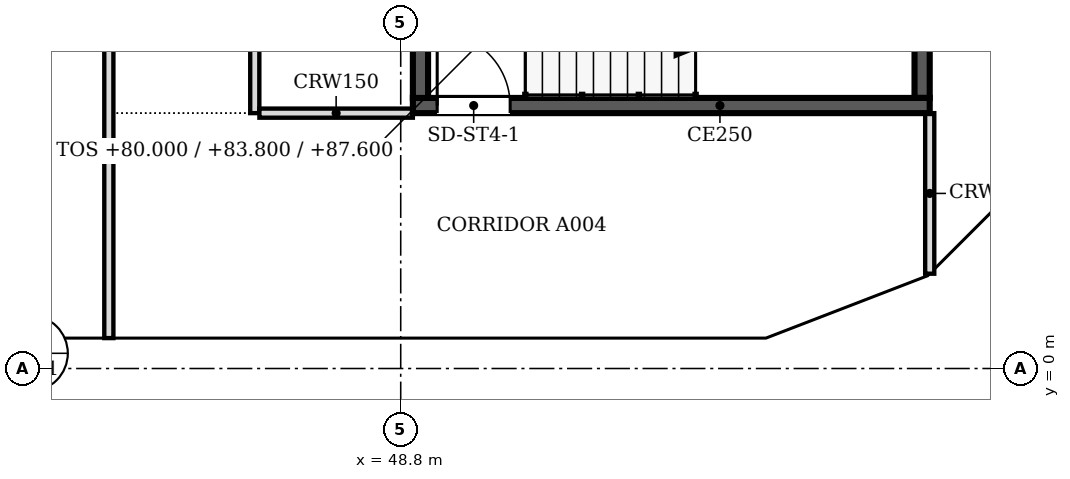
"""IFC4 building model, lengths in metres.
Left out: names, types, materials, properties, quantities, classifications, styles, units other than length and angle.
Written with IfcOpenShell. Run it as: python <this file> out.ifc"""

import sys

from ifc_helpers import new_model, si_unit, direction, frame, frame_2d, origin, place, context, subcontext, project, spatial, polyline, rectangle, outline, extrude, faceted_brep, source, transform, mapped, element, fill, save


model = new_model("IFC4")
c1 = context("Model", 3, precision=1e-05, world=origin(), true_north=direction((0.0, 1.0)))
c2 = subcontext(c1, "Body", "Model", "MODEL_VIEW")
j1 = project(units=[si_unit("LENGTHUNIT", "METRE"), si_unit("PLANEANGLEUNIT", "RADIAN")], contexts=[c1])
p1 = place(None, origin())
s1 = spatial("IfcSite", under=j1, at=p1, CompositionType="ELEMENT")
p2 = place(p1, origin())
s2 = spatial("IfcBuilding", under=s1, at=p2, CompositionType="ELEMENT")
p3 = place(p2, frame((0.0, 0.0, 80.0)))
s3 = spatial("IfcBuildingStorey", under=s2, at=p3, CompositionType="ELEMENT", Elevation=80.0)
m1 = source(origin(), c2, "Body", "SweptSolid", [
    extrude(outline(polyline([(3.05, 0.0), (6.1, 3.8), (3.05, 7.6), (0.0, 3.8), (3.05, 0.0)])), frame((0.0, 0.25, 0.0), z_axis=(0.0, -1.0, 0.0), x_axis=(1.0, 0.0, 0.0)), (0.0, 0.0, 1.0), 0.5),
])
p4 = place(p3, frame((42.7, 0.25, -3.8), z_axis=(0.0, 0.0, 1.0), x_axis=(1.0, 0.0, 0.0)))
e1 = element("IfcWall", 1, at=p4, inside=s3, PredefinedType="SOLIDWALL", context=c2, shape_type="MappedRepresentation", body=[
    mapped(m1, transform((0.0, 0.0, 0.0), scale=1.0)),
])
m2 = source(origin(), c2, "Body", "SweptSolid", [
    extrude(outline(polyline([(3.05, 0.399), (5.78, 3.8), (3.05, 7.201), (0.321, 3.8), (3.05, 0.399)])), frame((0.0, 0.26, 0.0), z_axis=(0.0, -1.0, 0.0), x_axis=(1.0, 0.0, 0.0)), (0.0, 0.0, 1.0), 0.52),
])
p5 = place(p4, origin())
e2 = element("IfcOpeningElement", 2, at=p5, cuts=e1, PredefinedType="OPENING", context=c2, shape_type="MappedRepresentation", body=[
    mapped(m2, transform((0.0, 0.0, 0.0), scale=1.0)),
])
m3 = source(origin(), c2, "Body", "Brep", [
    faceted_brep([(3.05, -0.25, 0.0), (6.053, -0.25, 3.8), (3.05, -0.25, 7.6), (0.0, -0.25, 3.8), (0.0, 0.25, 3.8), (3.05, 0.25, 7.6), (6.007, 0.25, 3.859), (6.007, 0.25, 3.741), (3.05, 0.25, 0.0), (6.053, 0.0, 3.8)], [[[0, 1, 2, 3]], [[4, 5, 6, 7, 8]], [[8, 7, 9, 1, 0]], [[6, 5, 2, 1, 9]], [[5, 4, 3, 2]], [[4, 8, 0, 3]], [[9, 7, 6]]]),
])
p6 = place(p3, frame((48.8, 0.25, -3.8), z_axis=(0.0, 0.0, 1.0), x_axis=(1.0, 0.0, 0.0)))
e3 = element("IfcWall", 3, at=p6, inside=s3, PredefinedType="SOLIDWALL", context=c2, shape_type="MappedRepresentation", body=[
    mapped(m3, transform((0.0, 0.0, 0.0), scale=1.0)),
])
m4 = source(origin(), c2, "Body", "SweptSolid", [
    extrude(outline(polyline([(3.049, 0.401), (5.735, 3.8), (3.049, 7.199), (0.321, 3.8), (3.049, 0.401)])), frame((0.0, 0.26, 0.0), z_axis=(0.0, -1.0, 0.0), x_axis=(1.0, 0.0, 0.0)), (0.0, 0.0, 1.0), 0.52),
])
p7 = place(p6, origin())
e4 = element("IfcOpeningElement", 4, at=p7, cuts=e3, PredefinedType="OPENING", context=c2, shape_type="MappedRepresentation", body=[
    mapped(m4, transform((0.0, 0.0, 0.0), scale=1.0)),
])
m5 = source(origin(), c2, "Body", "Brep", [
    faceted_brep([(2.95, -0.25, 0.0), (3.003, -0.25, 0.068), (3.003, -0.25, 7.532), (2.95, -0.25, 7.6), (0.0, -0.25, 3.8), (0.047, 0.25, 3.86), (2.898, 0.25, 7.532), (2.898, 0.25, 0.068), (0.047, 0.25, 3.74), (2.95, 0.0, 0.0), (2.95, 0.0, 7.6), (0.0, 0.0, 3.8)], [[[0, 1, 2, 3, 4]], [[5, 6, 7, 8]], [[1, 0, 9]], [[10, 3, 2]], [[6, 5, 11, 4, 3, 10]], [[8, 7, 9, 0, 4, 11]], [[8, 11, 5]], [[1, 9, 7, 6, 10, 2]]]),
])
p8 = place(p3, frame((54.854, 0.25, -3.8), z_axis=(0.0, 0.0, 1.0), x_axis=(0.932970071518, 0.359953949349, 0.0)))
e5 = element("IfcWall", 5, at=p8, inside=s3, PredefinedType="SOLIDWALL", context=c2, shape_type="MappedRepresentation", body=[
    mapped(m5, transform((0.0, 0.0, 0.0), scale=1.0)),
])
m6 = source(origin(), c2, "Body", "SweptSolid", [
    extrude(outline(polyline([(2.75, 6.935), (0.316, 3.8), (2.75, 0.665), (2.75, 6.935)])), frame((0.0, 0.26, 0.0), z_axis=(0.0, -1.0, 0.0), x_axis=(1.0, 0.0, 0.0)), (0.0, 0.0, 1.0), 0.52),
])
p9 = place(p8, origin())
e6 = element("IfcOpeningElement", 6, at=p9, cuts=e5, PredefinedType="OPENING", context=c2, shape_type="MappedRepresentation", body=[
    mapped(m6, transform((0.0, 0.0, 0.0), scale=1.0)),
])
m7 = source(origin(), c2, "Body", "Brep", [
    faceted_brep([(0.053, -0.25, 0.0), (2.997, -0.25, 3.8), (0.053, -0.25, 7.6), (0.0, -0.25, 7.532), (0.0, -0.25, 0.068), (0.106, 0.25, 7.532), (2.944, 0.25, 3.868), (2.944, 0.25, 3.732), (0.106, 0.25, 0.068), (2.997, 0.0, 3.8), (0.053, 0.0, 0.0), (0.053, 0.0, 7.6)], [[[0, 1, 2, 3, 4]], [[5, 6, 7, 8]], [[8, 7, 9, 1, 0, 10]], [[6, 5, 11, 2, 1, 9]], [[3, 2, 11]], [[10, 0, 4]], [[8, 10, 4, 3, 11, 5]], [[9, 7, 6]]]),
])
p10 = place(p3, frame((57.569, 1.274, -3.8), z_axis=(0.0, 0.0, 1.0), x_axis=(0.707066050402, 0.707147509625, 0.0)))
e7 = element("IfcWall", 7, at=p10, inside=s3, PredefinedType="SOLIDWALL", context=c2, shape_type="MappedRepresentation", body=[
    mapped(m7, transform((0.0, 0.0, 0.0), scale=1.0)),
])
m8 = source(origin(), c2, "Body", "SweptSolid", [
    extrude(outline(polyline([(0.253, 0.666), (2.681, 3.8), (0.253, 6.934), (0.253, 0.666)])), frame((0.0, 0.26, 0.0), z_axis=(0.0, -1.0, 0.0), x_axis=(1.0, 0.0, 0.0)), (0.0, 0.0, 1.0), 0.52),
])
p11 = place(p10, origin())
e8 = element("IfcOpeningElement", 8, at=p11, cuts=e7, PredefinedType="OPENING", context=c2, shape_type="MappedRepresentation", body=[
    mapped(m8, transform((0.0, 0.0, 0.0), scale=1.0)),
])
p12 = place(p2, frame((0.0, 0.0, 83.8)))
s4 = spatial("IfcBuildingStorey", under=s2, at=p12, CompositionType="ELEMENT", Elevation=83.8)
p13 = place(p12, frame((39.65, 0.25, -3.8), z_axis=(0.0, 0.0, 1.0), x_axis=(1.0, 0.0, 0.0)))
e9 = element("IfcWall", 9, at=p13, inside=s4, PredefinedType="SOLIDWALL", context=c2, shape_type="MappedRepresentation", body=[
    mapped(m1, transform((0.0, 0.0, 0.0), scale=1.0)),
])
p14 = place(p13, origin())
e10 = element("IfcOpeningElement", 10, at=p14, cuts=e9, PredefinedType="OPENING", context=c2, shape_type="MappedRepresentation", body=[
    mapped(m2, transform((0.0, 0.0, 0.0), scale=1.0)),
])
p15 = place(p12, frame((45.75, 0.25, -3.8), z_axis=(0.0, 0.0, 1.0), x_axis=(1.0, 0.0, 0.0)))
e11 = element("IfcWall", 11, at=p15, inside=s4, PredefinedType="SOLIDWALL", context=c2, shape_type="MappedRepresentation", body=[
    mapped(m1, transform((0.0, 0.0, 0.0), scale=1.0)),
])
p16 = place(p15, origin())
e12 = element("IfcOpeningElement", 12, at=p16, cuts=e11, PredefinedType="OPENING", context=c2, shape_type="MappedRepresentation", body=[
    mapped(m2, transform((0.0, 0.0, 0.0), scale=1.0)),
])
m9 = source(origin(), c2, "Body", "Brep", [
    faceted_brep([(3.003, -0.25, 0.0), (3.05, -0.25, 0.06), (3.05, -0.25, 7.54), (3.003, -0.25, 7.6), (0.0, -0.25, 3.8), (0.0, 0.25, 3.8), (2.957, 0.25, 7.541), (2.957, 0.25, 0.059), (3.003, 0.0, 0.0), (3.003, 0.0, 7.6)], [[[0, 1, 2, 3, 4]], [[5, 6, 7]], [[1, 0, 8]], [[9, 3, 2]], [[6, 5, 4, 3, 9]], [[5, 7, 8, 0, 4]], [[1, 8, 7, 6, 9, 2]]]),
])
p17 = place(p12, frame((51.85, 0.25, -3.8), z_axis=(0.0, 0.0, 1.0), x_axis=(1.0, 0.0, 0.0)))
e13 = element("IfcWall", 13, at=p17, inside=s4, PredefinedType="SOLIDWALL", context=c2, shape_type="MappedRepresentation", body=[
    mapped(m9, transform((0.0, 0.0, 0.0), scale=1.0)),
])
m10 = source(origin(), c2, "Body", "SweptSolid", [
    extrude(outline(polyline([(2.803, 6.944), (0.319, 3.8), (2.803, 0.656), (2.803, 6.944)])), frame((0.0, 0.26, 0.0), z_axis=(0.0, -1.0, 0.0), x_axis=(1.0, 0.0, 0.0)), (0.0, 0.0, 1.0), 0.52),
])
p18 = place(p17, origin())
e14 = element("IfcOpeningElement", 14, at=p18, cuts=e13, PredefinedType="OPENING", context=c2, shape_type="MappedRepresentation", body=[
    mapped(m10, transform((0.0, 0.0, 0.0), scale=1.0)),
])
m11 = source(origin(), c2, "Body", "Brep", [
    faceted_brep([(0.047, -0.25, 0.0), (2.997, -0.25, 3.8), (0.047, -0.25, 7.6), (0.0, -0.25, 7.541), (0.0, -0.25, 0.059), (0.093, 0.25, 7.54), (2.944, 0.25, 3.868), (2.944, 0.25, 3.732), (0.093, 0.25, 0.06), (2.997, 0.0, 3.8), (0.047, 0.0, 0.0), (0.047, 0.0, 7.6)], [[[0, 1, 2, 3, 4]], [[5, 6, 7, 8]], [[8, 7, 9, 1, 0, 10]], [[6, 5, 11, 2, 1, 9]], [[3, 2, 11]], [[10, 0, 4]], [[8, 10, 4, 3, 11, 5]], [[9, 7, 6]]]),
])
p19 = place(p12, frame((54.81, 0.233, -3.8), z_axis=(0.0, 0.0, 1.0), x_axis=(0.932990326376, 0.359901446078, 0.0)))
e15 = element("IfcWall", 15, at=p19, inside=s4, PredefinedType="SOLIDWALL", context=c2, shape_type="MappedRepresentation", body=[
    mapped(m11, transform((0.0, 0.0, 0.0), scale=1.0)),
])
m12 = source(origin(), c2, "Body", "SweptSolid", [
    extrude(outline(polyline([(0.247, 0.665), (2.681, 3.8), (0.247, 6.935), (0.247, 0.665)])), frame((0.0, 0.26, 0.0), z_axis=(0.0, -1.0, 0.0), x_axis=(1.0, 0.0, 0.0)), (0.0, 0.0, 1.0), 0.52),
])
p20 = place(p19, origin())
e16 = element("IfcOpeningElement", 16, at=p20, cuts=e15, PredefinedType="OPENING", context=c2, shape_type="MappedRepresentation", body=[
    mapped(m12, transform((0.0, 0.0, 0.0), scale=1.0)),
])
m13 = source(origin(), c2, "Body", "Brep", [
    faceted_brep([(2.944, -0.25, 0.0), (2.997, -0.25, 0.068), (2.997, -0.25, 7.532), (2.944, -0.25, 7.6), (0.0, -0.25, 3.8), (0.053, 0.25, 3.868), (2.891, 0.25, 7.532), (2.891, 0.25, 0.068), (0.053, 0.25, 3.732), (2.944, 0.0, 0.0), (2.944, 0.0, 7.6), (0.0, 0.0, 3.8)], [[[0, 1, 2, 3, 4]], [[5, 6, 7, 8]], [[1, 0, 9]], [[10, 3, 2]], [[6, 5, 11, 4, 3, 10]], [[8, 7, 9, 0, 4, 11]], [[8, 11, 5]], [[1, 9, 7, 6, 10, 2]]]),
])
p21 = place(p12, frame((57.606, 1.312, -3.8), z_axis=(0.0, 0.0, 1.0), x_axis=(0.707147509625, 0.707066050402, 0.0)))
e17 = element("IfcWall", 17, at=p21, inside=s4, PredefinedType="SOLIDWALL", context=c2, shape_type="MappedRepresentation", body=[
    mapped(m13, transform((0.0, 0.0, 0.0), scale=1.0)),
])
m14 = source(origin(), c2, "Body", "SweptSolid", [
    extrude(outline(polyline([(2.744, 6.934), (0.316, 3.8), (2.744, 0.666), (2.744, 6.934)])), frame((0.0, 0.26, 0.0), z_axis=(0.0, -1.0, 0.0), x_axis=(1.0, 0.0, 0.0)), (0.0, 0.0, 1.0), 0.52),
])
p22 = place(p21, origin())
e18 = element("IfcOpeningElement", 18, at=p22, cuts=e17, PredefinedType="OPENING", context=c2, shape_type="MappedRepresentation", body=[
    mapped(m14, transform((0.0, 0.0, 0.0), scale=1.0)),
])
p23 = place(p3, frame((57.5, 4.325, 0.0), z_axis=(0.0, 0.0, 1.0), x_axis=(-1.0, 0.0, 0.0)))
e19 = element("IfcWall", 19, at=p23, inside=s3, PredefinedType="SOLIDWALL", context=c2, shape_type="SweptSolid", body=[
    extrude(rectangle(XDim=8.5, YDim=0.25, at=frame_2d((4.25, 0.0))), origin(), (0.0, 0.0, 1.0), 3.8),
])
m15 = source(origin(), c2, "Body", "SweptSolid", [
    extrude(rectangle(XDim=1.2, YDim=2.1, at=frame_2d((0.6, 1.05))), frame((0.0, 0.135, 0.0), z_axis=(0.0, -1.0, 0.0), x_axis=(1.0, 0.0, 0.0)), (0.0, 0.0, 1.0), 0.27),
])
p24 = place(p23, frame((6.9, 0.0, 0.0)))
e20 = element("IfcOpeningElement", 20, at=p24, cuts=e19, PredefinedType="OPENING", context=c2, shape_type="MappedRepresentation", body=[
    mapped(m15, transform((0.0, 0.0, 0.0), scale=1.0)),
])
for number, where, z_axis, x_axis in (
    (21, (49.125, 4.45, 0.0), (0.0, 0.0, 1.0), (0.0, 1.0, 0.0)),
    (22, (57.375, 7.85, 0.0), (0.0, 0.0, 1.0), (0.0, -1.0, 0.0)),
):
    element("IfcWall", number, at=place(p3, frame(where, z_axis=z_axis, x_axis=x_axis)), inside=s3, PredefinedType="SOLIDWALL", context=c2, shape_type="SweptSolid", body=[
        extrude(rectangle(XDim=3.4, YDim=0.25, at=frame_2d((1.7, 0.0))), origin(), (0.0, 0.0, 1.0), 3.8),
    ])
p25 = place(p3, frame((44.0, 0.5, 0.0), z_axis=(0.0, 0.0, 1.0), x_axis=(0.0, 1.0, 0.0)))
e23 = element("IfcWall", 23, at=p25, inside=s3, PredefinedType="PARTITIONING", context=c2, shape_type="SweptSolid", body=[
    extrude(rectangle(XDim=21.424, YDim=0.15, at=frame_2d((10.712, 0.0))), origin(), (0.0, 0.0, 1.0), 3.067),
])
m16 = source(origin(), c2, "Body", "SweptSolid", [
    extrude(rectangle(XDim=0.9, YDim=2.1, at=frame_2d((0.45, 1.05))), frame((0.0, 0.085, 0.0), z_axis=(0.0, -1.0, 0.0), x_axis=(1.0, 0.0, 0.0)), (0.0, 0.0, 1.0), 0.17),
])
p26 = place(p25, frame((6.2, 0.0, 0.0)))
e24 = element("IfcOpeningElement", 24, at=p26, cuts=e23, PredefinedType="OPENING", context=c2, shape_type="MappedRepresentation", body=[
    mapped(m16, transform((0.0, 0.0, 0.0), scale=1.0)),
])
p27 = place(p25, frame((15.1, 0.0, 0.0)))
e25 = element("IfcOpeningElement", 25, at=p27, cuts=e23, PredefinedType="OPENING", context=c2, shape_type="MappedRepresentation", body=[
    mapped(m16, transform((0.0, 0.0, 0.0), scale=1.0)),
])
p28 = place(p3, frame((57.5, 1.559, 0.0), z_axis=(0.0, 0.0, 1.0), x_axis=(0.0, 1.0, 0.0)))
e26 = element("IfcWall", 26, at=p28, inside=s3, PredefinedType="PARTITIONING", context=c2, shape_type="SweptSolid", body=[
    extrude(rectangle(XDim=2.641, YDim=0.15, at=frame_2d((1.32, 0.0))), origin(), (0.0, 0.0, 1.0), 3.067),
])
p29 = place(p3, frame((46.4, 21.924, 0.0), z_axis=(0.0, 0.0, 1.0), x_axis=(0.0, -1.0, 0.0)))
e27 = element("IfcWall", 27, at=p29, inside=s3, PredefinedType="PARTITIONING", context=c2, shape_type="SweptSolid", body=[
    extrude(rectangle(XDim=17.724, YDim=0.15, at=frame_2d((8.862, 0.0))), origin(), (0.0, 0.0, 1.0), 3.067),
])
p30 = place(p29, frame((3.423, 0.0, 0.0)))
e28 = element("IfcOpeningElement", 28, at=p30, cuts=e27, PredefinedType="OPENING", context=c2, shape_type="MappedRepresentation", body=[
    mapped(m16, transform((0.0, 0.0, 0.0), scale=1.0)),
])
p31 = place(p29, frame((12.324, 0.0, 0.0)))
e29 = element("IfcOpeningElement", 29, at=p31, cuts=e27, PredefinedType="OPENING", context=c2, shape_type="MappedRepresentation", body=[
    mapped(m16, transform((0.0, 0.0, 0.0), scale=1.0)),
])
p32 = place(p3, frame((46.476, 4.2, 0.0), z_axis=(0.0, 0.0, 1.0), x_axis=(1.0, 0.0, 0.0)))
e30 = element("IfcWall", 30, at=p32, inside=s3, PredefinedType="PARTITIONING", context=c2, shape_type="SweptSolid", body=[
    extrude(rectangle(XDim=2.524, YDim=0.15, at=frame_2d((1.262, 0.0))), origin(), (0.0, 0.0, 1.0), 3.067),
])
m17 = source(origin(), c2, "Body", "SweptSolid", [
    extrude(rectangle(XDim=1.2, YDim=2.1, at=frame_2d((0.6, 1.05))), frame((0.0, 0.025, 0.0), z_axis=(0.0, -1.0, 0.0), x_axis=(1.0, 0.0, 0.0)), (0.0, 0.0, 1.0), 0.05),
])
p33 = place(p24, origin())
e31 = element("IfcDoor", 31, at=p33, inside=s3, OperationType="SINGLE_SWING_RIGHT", PredefinedType="DOOR", context=c2, shape_type="MappedRepresentation", body=[
    mapped(m17, transform((0.0, 0.0, 0.0), scale=1.0)),
])
fill(e20, e31)
save(model, sys.argv[1])
